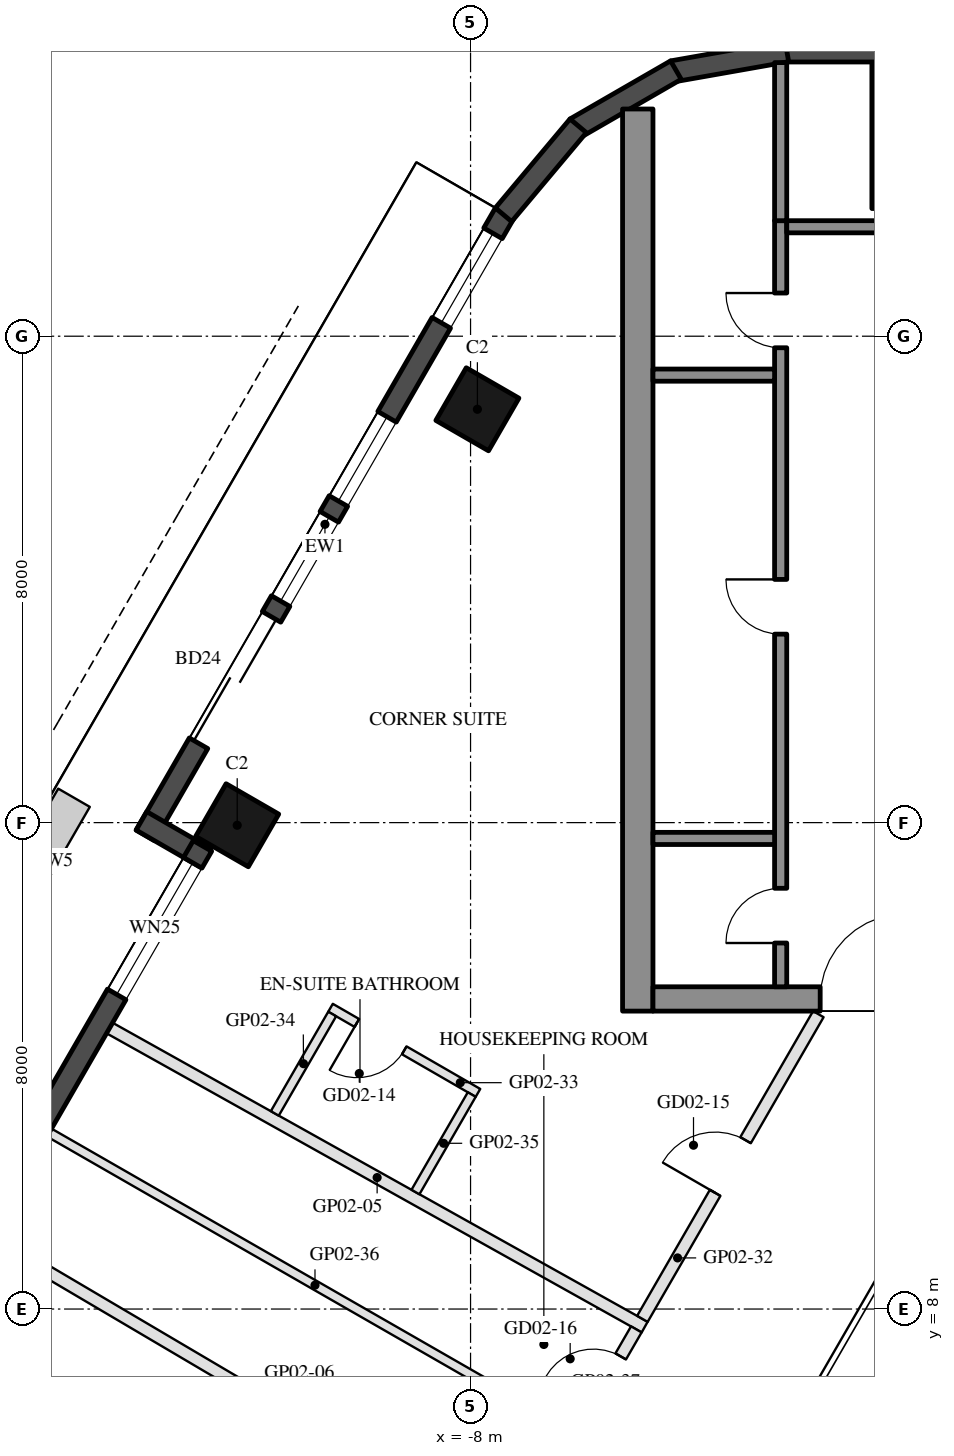
"""IFC4 building model, lengths in metres.
Left out: names, types, materials, properties, quantities, classifications, styles, units other than length and angle.
Written with IfcOpenShell. Run it as: python <this file> out.ifc"""

import sys

from ifc_helpers import new_model, si_unit, direction, frame, frame_2d, origin, origin_2d, place, context, subcontext, project, spatial, rectangle, hollow_rectangle, extrude, element, fill, save


model = new_model("IFC4")
c1 = context("Model", 3, precision=1e-05, world=origin(), true_north=direction((0.0, 1.0)))
c2 = subcontext(c1, "Body", "Model", "MODEL_VIEW")
j1 = project(units=[si_unit("LENGTHUNIT", "METRE"), si_unit("PLANEANGLEUNIT", "RADIAN")], contexts=[c1])
p1 = place(None, origin())
s1 = spatial("IfcSite", under=j1, at=p1, CompositionType="ELEMENT")
p2 = place(p1, origin())
s2 = spatial("IfcBuilding", under=s1, at=p2, CompositionType="ELEMENT")
p3 = place(p2, frame((0.0, 0.0, 53.9)))
s3 = spatial("IfcBuildingStorey", under=s2, at=p3, CompositionType="ELEMENT", Elevation=53.9)
for number, where, z_axis, x_axis in (
    (1, (-7.888, 22.798, 0.0), (0.0, 0.0, 1.0), (0.5, 0.866, 0.0)),
    (2, (-11.838, 15.957, 0.0), (0.0, 0.0, 1.0), (0.5, 0.866, 0.0)),
):
    element("IfcColumn", number, at=place(p3, frame(where, z_axis=z_axis, x_axis=x_axis)), inside=s3, PredefinedType="COLUMN", context=c2, shape_type="SweptSolid", body=[
        extrude(hollow_rectangle(XDim=1.0, YDim=1.0, WallThickness=0.045, at=origin_2d()), origin(), (0.0, 0.0, 1.0), 3.7),
    ])
p4 = place(p3, frame((0.0, 27.3, 0.0), z_axis=(0.0, 0.0, 1.0), x_axis=(1.0, 0.0, 0.0)))
e3 = element("IfcColumn", 3, at=p4, inside=s3, PredefinedType="COLUMN", context=c2, shape_type="SweptSolid", body=[
    extrude(hollow_rectangle(XDim=2.8, YDim=2.4, WallThickness=0.07, at=origin_2d()), origin(), (0.0, 0.0, 1.0), 3.7),
])
p5 = place(p3, frame((-7.441, 26.022, 0.0), z_axis=(0.0, 0.0, 1.0), x_axis=(-0.499992533062, -0.86602971478, 0.0)))
e4 = element("IfcWall", 4, at=p5, inside=s3, PredefinedType="SOLIDWALL", context=c2, shape_type="SweptSolid", body=[
    extrude(rectangle(XDim=11.816, YDim=0.35, at=frame_2d((5.908, 0.0))), origin(), (0.0, 0.0, 1.0), 3.55),
])
p6 = place(p5, frame((0.381, 0.0, 0.3)))
e5 = element("IfcOpeningElement", 5, at=p6, cuts=e4, PredefinedType="OPENING", context=c2, shape_type="SweptSolid", body=[
    extrude(rectangle(XDim=1.7, YDim=2.65, at=frame_2d((0.85, 1.325))), frame((0.0, 0.185, 0.0), z_axis=(0.0, -1.0, 0.0), x_axis=(1.0, 0.0, 0.0)), (0.0, 0.0, 1.0), 0.37),
])
p7 = place(p5, frame((7.666, 0.0, 0.0)))
e6 = element("IfcOpeningElement", 6, at=p7, cuts=e4, PredefinedType="OPENING", context=c2, shape_type="SweptSolid", body=[
    extrude(rectangle(XDim=2.4, YDim=2.4, at=frame_2d((1.2, 1.2))), frame((0.0, 0.185, 0.0), z_axis=(0.0, -1.0, 0.0), x_axis=(1.0, 0.0, 0.0)), (0.0, 0.0, 1.0), 0.37),
])
p8 = place(p5, frame((3.865, 0.0, 0.3)))
e7 = element("IfcOpeningElement", 7, at=p8, cuts=e4, PredefinedType="OPENING", context=c2, shape_type="SweptSolid", body=[
    extrude(rectangle(XDim=1.6, YDim=2.65, at=frame_2d((0.8, 1.325))), frame((0.0, 0.185, 0.0), z_axis=(0.0, -1.0, 0.0), x_axis=(1.0, 0.0, 0.0)), (0.0, 0.0, 1.0), 0.37),
])
p9 = place(p5, frame((5.765, 0.0, 0.3)))
e8 = element("IfcOpeningElement", 8, at=p9, cuts=e4, PredefinedType="OPENING", context=c2, shape_type="SweptSolid", body=[
    extrude(rectangle(XDim=1.6, YDim=2.65, at=frame_2d((0.8, 1.325))), frame((0.0, 0.185, 0.0), z_axis=(0.0, -1.0, 0.0), x_axis=(1.0, 0.0, 0.0)), (0.0, 0.0, 1.0), 0.37),
])
p10 = place(p3, frame((-13.413, 16.029, 0.0), z_axis=(0.0, 0.0, 1.0), x_axis=(0.866005645448, -0.500034220881, 0.0)))
e9 = element("IfcWall", 9, at=p10, inside=s3, PredefinedType="SOLIDWALL", context=c2, shape_type="SweptSolid", body=[
    extrude(rectangle(XDim=1.22, YDim=0.35, at=frame_2d((0.61, 0.0))), origin(), (0.0, 0.0, 1.0), 3.55),
])
p11 = place(p3, frame((-12.409, 15.617, 0.0), z_axis=(0.0, 0.0, 1.0), x_axis=(-0.500003597184, -0.866023326939, 0.0)))
e10 = element("IfcWall", 10, at=p11, inside=s3, PredefinedType="SOLIDWALL", context=c2, shape_type="SweptSolid", body=[
    extrude(rectangle(XDim=6.74, YDim=0.35, at=frame_2d((3.37, 0.0))), origin(), (0.0, 0.0, 1.0), 3.55),
])
p12 = place(p11, frame((0.32, 0.0, 0.3)))
e11 = element("IfcOpeningElement", 11, at=p12, cuts=e10, PredefinedType="OPENING", context=c2, shape_type="SweptSolid", body=[
    extrude(rectangle(XDim=2.5, YDim=2.65, at=frame_2d((1.25, 1.325))), frame((0.0, 0.185, 0.0), z_axis=(0.0, -1.0, 0.0), x_axis=(1.0, 0.0, 0.0)), (0.0, 0.0, 1.0), 0.37),
])
p13 = place(p3, frame((2.829, 28.685, 0.0), z_axis=(0.0, 0.0, 1.0), x_axis=(-1.0, 0.0, 0.0)))
e12 = element("IfcWall", 12, at=p13, inside=s3, PredefinedType="SOLIDWALL", context=c2, shape_type="SweptSolid", body=[
    extrude(rectangle(XDim=5.658, YDim=0.35, at=frame_2d((2.829, 0.0))), origin(), (0.0, 0.0, 1.0), 3.55),
])
for number, where, z_axis, x_axis in (
    (13, (-2.799, 28.688, 0.0), (0.0, 0.0, 1.0), (-0.985, -0.174, 0.0)),
    (14, (-4.623, 28.377, 0.0), (0.0, 0.0, 1.0), (-0.866, -0.5, 0.0)),
):
    element("IfcWall", number, at=place(p3, frame(where, z_axis=z_axis, x_axis=x_axis)), inside=s3, PredefinedType="SOLIDWALL", context=c2, shape_type="SweptSolid", body=[
        extrude(rectangle(XDim=1.91, YDim=0.35, at=frame_2d((0.955, 0.0))), origin(), (0.0, 0.0, 1.0), 3.55),
    ])
p14 = place(p3, frame((-6.23, 27.461, 0.0), z_axis=(0.0, 0.0, 1.0), x_axis=(-0.642808304945, -0.766027077259, 0.0)))
e15 = element("IfcWall", 15, at=p14, inside=s3, PredefinedType="SOLIDWALL", context=c2, shape_type="SweptSolid", body=[
    extrude(rectangle(XDim=1.91, YDim=0.35, at=frame_2d((0.955, 0.0))), origin(), (0.0, 0.0, 1.0), 3.55),
])
p15 = place(p3, frame((-5.25, 12.9, 0.0), z_axis=(0.0, 0.0, 1.0), x_axis=(0.0, 1.0, 0.0)))
e16 = element("IfcWall", 16, at=p15, inside=s3, PredefinedType="SHEAR", context=c2, shape_type="SweptSolid", body=[
    extrude(rectangle(XDim=14.837, YDim=0.5, at=frame_2d((7.418, 0.0))), origin(), (0.0, 0.0, 1.0), 3.5),
])
p16 = place(p3, frame((5.0, 13.1, 0.0), z_axis=(0.0, 0.0, 1.0), x_axis=(-1.0, 0.0, 0.0)))
e17 = element("IfcWall", 17, at=p16, inside=s3, PredefinedType="SHEAR", context=c2, shape_type="SweptSolid", body=[
    extrude(rectangle(XDim=10.0, YDim=0.4, at=frame_2d((5.0, 0.0))), origin(), (0.0, 0.0, 1.0), 3.5),
])
p17 = place(p16, frame((3.55, 0.0, 0.0)))
e18 = element("IfcOpeningElement", 18, at=p17, cuts=e17, PredefinedType="OPENING", context=c2, shape_type="SweptSolid", body=[
    extrude(rectangle(XDim=1.1, YDim=2.1, at=frame_2d((0.55, 1.05))), frame((0.0, 0.21, 0.0), z_axis=(0.0, -1.0, 0.0), x_axis=(1.0, 0.0, 0.0)), (0.0, 0.0, 1.0), 0.42),
])
p18 = place(p16, frame((5.85, 0.0, 0.0)))
e19 = element("IfcOpeningElement", 19, at=p18, cuts=e17, PredefinedType="OPENING", context=c2, shape_type="SweptSolid", body=[
    extrude(rectangle(XDim=1.4, YDim=2.1, at=frame_2d((0.7, 1.05))), frame((0.0, 0.21, 0.0), z_axis=(0.0, -1.0, 0.0), x_axis=(1.0, 0.0, 0.0)), (0.0, 0.0, 1.0), 0.42),
])
p19 = place(p3, frame((-2.9, 13.3, 0.0), z_axis=(0.0, 0.0, 1.0), x_axis=(0.0, 1.0, 0.0)))
e20 = element("IfcWall", 20, at=p19, inside=s3, PredefinedType="SHEAR", context=c2, shape_type="SweptSolid", body=[
    extrude(rectangle(XDim=12.6, YDim=0.2, at=frame_2d((6.3, 0.0))), origin(), (0.0, 0.0, 1.0), 3.5),
])
p20 = place(p19, frame((0.72, 0.0, 0.0)))
e21 = element("IfcOpeningElement", 21, at=p20, cuts=e20, PredefinedType="OPENING", context=c2, shape_type="SweptSolid", body=[
    extrude(rectangle(XDim=0.9, YDim=2.1, at=frame_2d((0.45, 1.05))), frame((0.0, 0.11, 0.0), z_axis=(0.0, -1.0, 0.0), x_axis=(1.0, 0.0, 0.0)), (0.0, 0.0, 1.0), 0.22),
])
p21 = place(p19, frame((5.8, 0.0, 0.0)))
e22 = element("IfcOpeningElement", 22, at=p21, cuts=e20, PredefinedType="OPENING", context=c2, shape_type="SweptSolid", body=[
    extrude(rectangle(XDim=0.9, YDim=2.1, at=frame_2d((0.45, 1.05))), frame((0.0, 0.11, 0.0), z_axis=(0.0, -1.0, 0.0), x_axis=(1.0, 0.0, 0.0)), (0.0, 0.0, 1.0), 0.22),
])
p22 = place(p19, frame((10.51, 0.0, 0.0)))
e23 = element("IfcOpeningElement", 23, at=p22, cuts=e20, PredefinedType="OPENING", context=c2, shape_type="SweptSolid", body=[
    extrude(rectangle(XDim=0.9, YDim=2.1, at=frame_2d((0.45, 1.05))), frame((0.0, 0.11, 0.0), z_axis=(0.0, -1.0, 0.0), x_axis=(1.0, 0.0, 0.0)), (0.0, 0.0, 1.0), 0.22),
])
p23 = place(p3, frame((-0.4, 25.8, 0.0), z_axis=(0.0, 0.0, 1.0), x_axis=(-1.0, 0.0, 0.0)))
e24 = element("IfcWall", 24, at=p23, inside=s3, PredefinedType="SHEAR", context=c2, shape_type="SweptSolid", body=[
    extrude(rectangle(XDim=2.4, YDim=0.2, at=frame_2d((1.2, 0.0))), origin(), (0.0, 0.0, 1.0), 3.5),
])
for number, where, z_axis, x_axis in (
    (25, (-3.0, 15.74, 0.0), (0.0, 0.0, 1.0), (-1.0, 0.0, 0.0)),
    (26, (-3.0, 23.36, 0.0), (0.0, 0.0, 1.0), (-1.0, 0.0, 0.0)),
):
    element("IfcWall", number, at=place(p3, frame(where, z_axis=z_axis, x_axis=x_axis)), inside=s3, PredefinedType="SHEAR", context=c2, shape_type="SweptSolid", body=[
        extrude(rectangle(XDim=2.0, YDim=0.2, at=frame_2d((1.0, 0.0))), origin(), (0.0, 0.0, 1.0), 3.5),
    ])
p24 = place(p3, frame((-2.9, 25.9, 0.0), z_axis=(0.0, 0.0, 1.0), x_axis=(0.0, 1.0, 0.0)))
e27 = element("IfcWall", 27, at=p24, inside=s3, PredefinedType="SHEAR", context=c2, shape_type="SweptSolid", body=[
    extrude(rectangle(XDim=2.6, YDim=0.2, at=frame_2d((1.3, 0.0))), origin(), (0.0, 0.0, 1.0), 3.5),
])
p25 = place(p3, frame((-13.936, 12.622, 0.0), z_axis=(0.0, 0.0, 1.0), x_axis=(0.872898889426, -0.487901146585, 0.0)))
e28 = element("IfcWall", 28, at=p25, inside=s3, PredefinedType="PARTITIONING", context=c2, shape_type="SweptSolid", body=[
    extrude(rectangle(XDim=10.081, YDim=0.2, at=frame_2d((5.041, 0.0))), origin(), (0.0, 0.0, 1.0), 2.95),
])
p26 = place(p3, frame((-15.362, 8.853, 0.0), z_axis=(0.0, 0.0, 1.0), x_axis=(0.861347313363, -0.508016540835, 0.0)))
e29 = element("IfcWall", 29, at=p26, inside=s3, PredefinedType="PARTITIONING", context=c2, shape_type="SweptSolid", body=[
    extrude(rectangle(XDim=9.43, YDim=0.2, at=frame_2d((4.715, 0.0))), origin(), (0.0, 0.0, 1.0), 2.95),
])
p27 = place(p3, frame((-5.174, 7.838, 0.0), z_axis=(0.0, 0.0, 1.0), x_axis=(0.499973220989, 0.866040864101, 0.0)))
e30 = element("IfcWall", 30, at=p27, inside=s3, PredefinedType="PARTITIONING", context=c2, shape_type="SweptSolid", body=[
    extrude(rectangle(XDim=5.787, YDim=0.2, at=frame_2d((2.894, 0.0))), origin(), (0.0, 0.0, 1.0), 2.95),
])
p28 = place(p27, frame((2.393, 0.0, 0.0)))
e31 = element("IfcOpeningElement", 31, at=p28, cuts=e30, PredefinedType="OPENING", context=c2, shape_type="SweptSolid", body=[
    extrude(rectangle(XDim=1.0, YDim=2.1, at=frame_2d((0.5, 1.05))), frame((0.0, 0.11, 0.0), z_axis=(0.0, -1.0, 0.0), x_axis=(1.0, 0.0, 0.0)), (0.0, 0.0, 1.0), 0.22),
])
p29 = place(p3, frame((-7.878, 11.555, 0.0), z_axis=(0.0, 0.0, 1.0), x_axis=(-0.865996816683, 0.500049511043, 0.0)))
e32 = element("IfcWall", 32, at=p29, inside=s3, PredefinedType="PARTITIONING", context=c2, shape_type="SweptSolid", body=[
    extrude(rectangle(XDim=2.8, YDim=0.15, at=frame_2d((1.4, 0.0))), origin(), (0.0, 0.0, 1.0), 3.55),
])
p30 = place(p29, frame((1.4, 0.0, 0.0)))
e33 = element("IfcOpeningElement", 33, at=p30, cuts=e32, PredefinedType="OPENING", context=c2, shape_type="SweptSolid", body=[
    extrude(rectangle(XDim=0.9, YDim=2.1, at=frame_2d((0.45, 1.05))), frame((0.0, 0.085, 0.0), z_axis=(0.0, -1.0, 0.0), x_axis=(1.0, 0.0, 0.0)), (0.0, 0.0, 1.0), 0.17),
])
p31 = place(p3, frame((-10.275, 12.853, 0.0), z_axis=(0.0, 0.0, 1.0), x_axis=(-0.499950073403, -0.866054227, 0.0)))
e34 = element("IfcWall", 34, at=p31, inside=s3, PredefinedType="PARTITIONING", context=c2, shape_type="SweptSolid", body=[
    extrude(rectangle(XDim=1.888, YDim=0.15, at=frame_2d((0.944, 0.0))), origin(), (0.0, 0.0, 1.0), 3.55),
])
p32 = place(p3, frame((-7.98, 11.528, 0.0), z_axis=(0.0, 0.0, 1.0), x_axis=(-0.500011685716, -0.866018656928, 0.0)))
e35 = element("IfcWall", 35, at=p32, inside=s3, PredefinedType="PARTITIONING", context=c2, shape_type="SweptSolid", body=[
    extrude(rectangle(XDim=1.851, YDim=0.15, at=frame_2d((0.926, 0.0))), origin(), (0.0, 0.0, 1.0), 3.55),
])
p33 = place(p3, frame((-14.929, 10.902, 0.0), z_axis=(0.0, 0.0, 1.0), x_axis=(0.867191892367, -0.497974117614, 0.0)))
e36 = element("IfcWall", 36, at=p33, inside=s3, PredefinedType="PARTITIONING", context=c2, shape_type="SweptSolid", body=[
    extrude(rectangle(XDim=10.08, YDim=0.15, at=frame_2d((5.04, 0.0))), origin(), (0.0, 0.0, 1.0), 2.96),
])
p34 = place(p3, frame((-6.237, 5.997, 0.0), z_axis=(0.0, 0.0, 1.0), x_axis=(0.500051616692, 0.865995600822, 0.0)))
e37 = element("IfcWall", 37, at=p34, inside=s3, PredefinedType="PARTITIONING", context=c2, shape_type="SweptSolid", body=[
    extrude(rectangle(XDim=1.926, YDim=0.2, at=frame_2d((0.963, 0.0))), origin(), (0.0, 0.0, 1.0), 2.95),
])
p35 = place(p34, frame((0.513, 0.0, 0.0)))
e38 = element("IfcOpeningElement", 38, at=p35, cuts=e37, PredefinedType="OPENING", context=c2, shape_type="SweptSolid", body=[
    extrude(rectangle(XDim=0.9, YDim=2.1, at=frame_2d((0.45, 1.05))), frame((0.0, 0.11, 0.0), z_axis=(0.0, -1.0, 0.0), x_axis=(1.0, 0.0, 0.0)), (0.0, 0.0, 1.0), 0.22),
])
p36 = place(p6, origin())
e39 = element("IfcWindow", 39, at=p36, inside=s3, PartitioningType="SINGLE_PANEL", PredefinedType="WINDOW", context=c2, shape_type="SweptSolid", body=[
    extrude(rectangle(XDim=1.7, YDim=2.65, at=frame_2d((0.85, 1.325))), frame((0.0, 0.03, 0.0), z_axis=(0.0, -1.0, 0.0), x_axis=(1.0, 0.0, 0.0)), (0.0, 0.0, 1.0), 0.06),
])
fill(e5, e39)
p37 = place(p7, frame((2.4, 0.0, 0.0), z_axis=(0.0, 0.0, 1.0), x_axis=(-1.0, 0.0, 0.0)))
e40 = element("IfcDoor", 40, at=p37, inside=s3, OperationType="SLIDING_TO_LEFT", PredefinedType="DOOR", context=c2, shape_type="SweptSolid", body=[
    extrude(rectangle(XDim=2.4, YDim=2.4, at=frame_2d((1.2, 1.2))), frame((0.0, 0.025, 0.0), z_axis=(0.0, -1.0, 0.0), x_axis=(1.0, 0.0, 0.0)), (0.0, 0.0, 1.0), 0.05),
])
fill(e6, e40)
p38 = place(p8, origin())
e41 = element("IfcWindow", 41, at=p38, inside=s3, PartitioningType="SINGLE_PANEL", PredefinedType="WINDOW", context=c2, shape_type="SweptSolid", body=[
    extrude(rectangle(XDim=1.6, YDim=2.65, at=frame_2d((0.8, 1.325))), frame((0.0, 0.03, 0.0), z_axis=(0.0, -1.0, 0.0), x_axis=(1.0, 0.0, 0.0)), (0.0, 0.0, 1.0), 0.06),
])
fill(e7, e41)
p39 = place(p9, origin())
e42 = element("IfcWindow", 42, at=p39, inside=s3, PartitioningType="SINGLE_PANEL", PredefinedType="WINDOW", context=c2, shape_type="SweptSolid", body=[
    extrude(rectangle(XDim=1.6, YDim=2.65, at=frame_2d((0.8, 1.325))), frame((0.0, 0.03, 0.0), z_axis=(0.0, -1.0, 0.0), x_axis=(1.0, 0.0, 0.0)), (0.0, 0.0, 1.0), 0.06),
])
fill(e8, e42)
p40 = place(p12, origin())
e43 = element("IfcWindow", 43, at=p40, inside=s3, PartitioningType="SINGLE_PANEL", PredefinedType="WINDOW", context=c2, shape_type="SweptSolid", body=[
    extrude(rectangle(XDim=2.5, YDim=2.65, at=frame_2d((1.25, 1.325))), frame((0.0, 0.03, 0.0), z_axis=(0.0, -1.0, 0.0), x_axis=(1.0, 0.0, 0.0)), (0.0, 0.0, 1.0), 0.06),
])
fill(e11, e43)
p41 = place(p20, origin())
e44 = element("IfcDoor", 44, at=p41, inside=s3, OperationType="SINGLE_SWING_LEFT", PredefinedType="DOOR", context=c2, shape_type="SweptSolid", body=[
    extrude(rectangle(XDim=0.9, YDim=2.1, at=frame_2d((0.45, 1.05))), frame((0.0, 0.025, 0.0), z_axis=(0.0, -1.0, 0.0), x_axis=(1.0, 0.0, 0.0)), (0.0, 0.0, 1.0), 0.05),
])
fill(e21, e44)
p42 = place(p21, origin())
e45 = element("IfcDoor", 45, at=p42, inside=s3, OperationType="SINGLE_SWING_RIGHT", PredefinedType="DOOR", context=c2, shape_type="SweptSolid", body=[
    extrude(rectangle(XDim=0.9, YDim=2.1, at=frame_2d((0.45, 1.05))), frame((0.0, 0.025, 0.0), z_axis=(0.0, -1.0, 0.0), x_axis=(1.0, 0.0, 0.0)), (0.0, 0.0, 1.0), 0.05),
])
fill(e22, e45)
p43 = place(p22, origin())
e46 = element("IfcDoor", 46, at=p43, inside=s3, OperationType="SINGLE_SWING_RIGHT", PredefinedType="DOOR", context=c2, shape_type="SweptSolid", body=[
    extrude(rectangle(XDim=0.9, YDim=2.1, at=frame_2d((0.45, 1.05))), frame((0.0, 0.025, 0.0), z_axis=(0.0, -1.0, 0.0), x_axis=(1.0, 0.0, 0.0)), (0.0, 0.0, 1.0), 0.05),
])
fill(e23, e46)
p44 = place(p18, frame((1.4, 0.0, 0.0), z_axis=(0.0, 0.0, 1.0), x_axis=(-1.0, 0.0, 0.0)))
e47 = element("IfcDoor", 47, at=p44, inside=s3, OperationType="DOUBLE_DOOR_SINGLE_SWING", PredefinedType="DOOR", context=c2, shape_type="SweptSolid", body=[
    extrude(rectangle(XDim=1.4, YDim=2.1, at=frame_2d((0.7, 1.05))), frame((0.0, 0.025, 0.0), z_axis=(0.0, -1.0, 0.0), x_axis=(1.0, 0.0, 0.0)), (0.0, 0.0, 1.0), 0.05),
])
fill(e19, e47)
p45 = place(p30, origin())
e48 = element("IfcDoor", 48, at=p45, inside=s3, OperationType="SINGLE_SWING_RIGHT", PredefinedType="DOOR", context=c2, shape_type="SweptSolid", body=[
    extrude(rectangle(XDim=0.9, YDim=2.1, at=frame_2d((0.45, 1.05))), frame((0.0, 0.025, 0.0), z_axis=(0.0, -1.0, 0.0), x_axis=(1.0, 0.0, 0.0)), (0.0, 0.0, 1.0), 0.05),
])
fill(e33, e48)
p46 = place(p28, origin())
e49 = element("IfcDoor", 49, at=p46, inside=s3, OperationType="SINGLE_SWING_LEFT", PredefinedType="DOOR", context=c2, shape_type="SweptSolid", body=[
    extrude(rectangle(XDim=1.0, YDim=2.1, at=frame_2d((0.5, 1.05))), frame((0.0, 0.025, 0.0), z_axis=(0.0, -1.0, 0.0), x_axis=(1.0, 0.0, 0.0)), (0.0, 0.0, 1.0), 0.05),
])
fill(e31, e49)
p47 = place(p35, origin())
e50 = element("IfcDoor", 50, at=p47, inside=s3, OperationType="SINGLE_SWING_LEFT", PredefinedType="DOOR", context=c2, shape_type="SweptSolid", body=[
    extrude(rectangle(XDim=0.9, YDim=2.1, at=frame_2d((0.45, 1.05))), frame((0.0, 0.025, 0.0), z_axis=(0.0, -1.0, 0.0), x_axis=(1.0, 0.0, 0.0)), (0.0, 0.0, 1.0), 0.05),
])
fill(e38, e50)
save(model, sys.argv[1])
